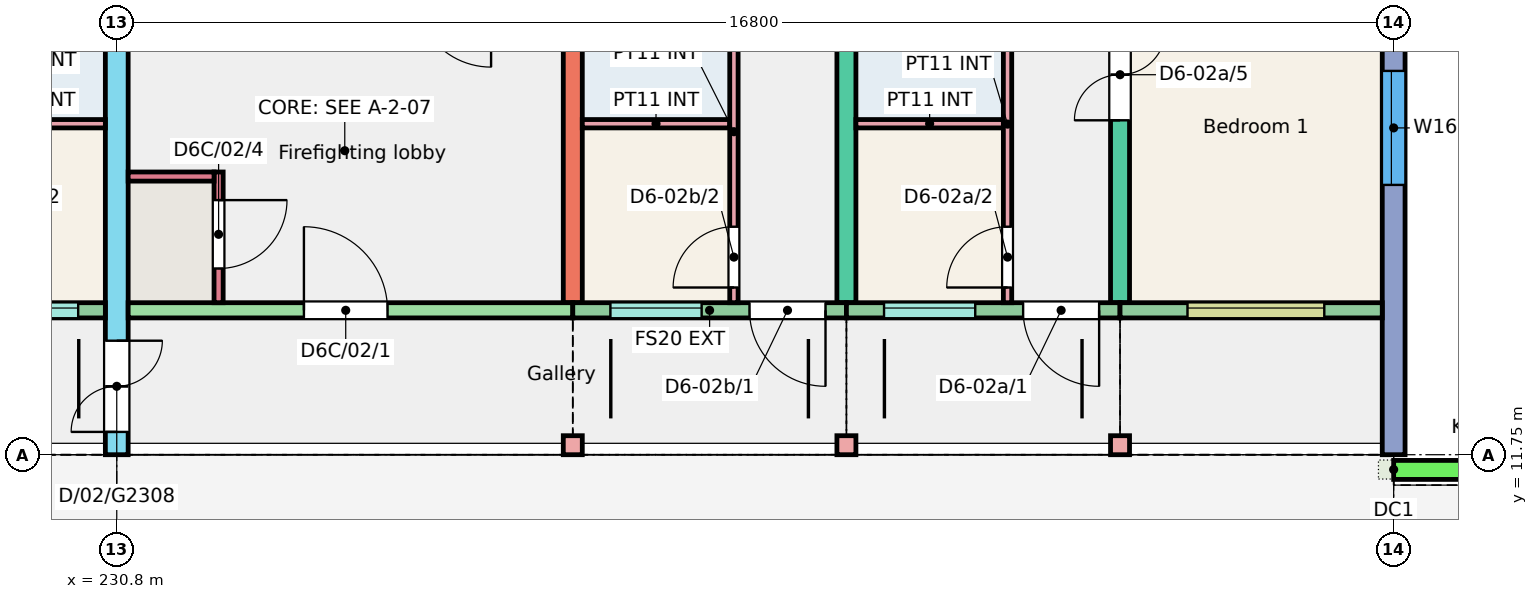
"""IFC4 building model, lengths in metres.
Left out: names, types, materials, properties, quantities, classifications, styles, units other than length and angle.
Written with IfcOpenShell. Run it as: python <this file> out.ifc"""

import sys

from ifc_helpers import new_model, si_unit, direction, frame, frame_2d, origin, origin_2d, place, context, subcontext, project, spatial, rectangle, extrude, element, fill, save


model = new_model("IFC4")
c1 = context("Model", 3, precision=1e-05, world=origin(), true_north=direction((0.0, 1.0)))
c2 = subcontext(c1, "Body", "Model", "MODEL_VIEW")
j1 = project(units=[si_unit("LENGTHUNIT", "METRE"), si_unit("PLANEANGLEUNIT", "RADIAN")], contexts=[c1])
p1 = place(None, origin())
s1 = spatial("IfcSite", under=j1, at=p1, CompositionType="ELEMENT")
p2 = place(p1, origin())
s2 = spatial("IfcBuilding", under=s1, at=p2, CompositionType="ELEMENT")
p3 = place(p2, frame((0.0, 0.0, 6.0)))
s3 = spatial("IfcBuildingStorey", under=s2, at=p3, CompositionType="ELEMENT", Elevation=6.0)
p4 = place(p3, frame((230.8, 11.75, 0.0), z_axis=(0.0, 0.0, 1.0), x_axis=(0.0, 1.0, 0.0)))
e1 = element("IfcWall", 1, at=p4, inside=s3, PredefinedType="SHEAR", context=c2, shape_type="SweptSolid", body=[
    extrude(rectangle(XDim=11.0, YDim=0.3, at=frame_2d((5.5, 0.0))), origin(), (0.0, 0.0, 1.0), 3.0),
])
p5 = place(p4, frame((0.3, 0.0, 0.0)))
e2 = element("IfcOpeningElement", 2, at=p5, cuts=e1, PredefinedType="OPENING", context=c2, shape_type="SweptSolid", body=[
    extrude(rectangle(XDim=1.2, YDim=2.1, at=frame_2d((0.6, 1.05))), frame((0.0, 0.16, 0.0), z_axis=(0.0, -1.0, 0.0), x_axis=(1.0, 0.0, 0.0)), (0.0, 0.0, 1.0), 0.32),
])
for number, where, z_axis, x_axis in (
    (3, (236.8, 13.75, 0.0), (0.0, 0.0, 1.0), (0.0, 1.0, 0.0)),
    (4, (240.4, 13.75, 0.0), (0.0, 0.0, 1.0), (0.0, 1.0, 0.0)),
):
    element("IfcWall", number, at=place(p3, frame(where, z_axis=z_axis, x_axis=x_axis)), inside=s3, PredefinedType="SHEAR", context=c2, shape_type="SweptSolid", body=[
        extrude(rectangle(XDim=9.0, YDim=0.25, at=frame_2d((4.5, 0.0))), origin(), (0.0, 0.0, 1.0), 3.0),
    ])
p6 = place(p3, frame((244.0, 13.75, 0.0), z_axis=(0.0, 0.0, 1.0), x_axis=(0.0, 1.0, 0.0)))
e5 = element("IfcWall", 5, at=p6, inside=s3, PredefinedType="SHEAR", context=c2, shape_type="SweptSolid", body=[
    extrude(rectangle(XDim=9.0, YDim=0.25, at=frame_2d((4.5, 0.0))), origin(), (0.0, 0.0, 1.0), 3.0),
])
p7 = place(p6, frame((2.4, 0.0, 0.0)))
e6 = element("IfcOpeningElement", 6, at=p7, cuts=e5, PredefinedType="OPENING", context=c2, shape_type="SweptSolid", body=[
    extrude(rectangle(XDim=1.2, YDim=2.1, at=frame_2d((0.6, 1.05))), frame((0.0, 0.135, 0.0), z_axis=(0.0, -1.0, 0.0), x_axis=(1.0, 0.0, 0.0)), (0.0, 0.0, 1.0), 0.27),
])
p8 = place(p6, frame((6.4, 0.0, 0.0)))
e7 = element("IfcOpeningElement", 7, at=p8, cuts=e5, PredefinedType="OPENING", context=c2, shape_type="SweptSolid", body=[
    extrude(rectangle(XDim=1.2, YDim=2.1, at=frame_2d((0.6, 1.05))), frame((0.0, 0.135, 0.0), z_axis=(0.0, -1.0, 0.0), x_axis=(1.0, 0.0, 0.0)), (0.0, 0.0, 1.0), 0.27),
])
p9 = place(p3, frame((247.6, 11.75, 0.0), z_axis=(0.0, 0.0, 1.0), x_axis=(0.0, 1.0, 0.0)))
e8 = element("IfcWall", 8, at=p9, inside=s3, PredefinedType="SHEAR", context=c2, shape_type="SweptSolid", body=[
    extrude(rectangle(XDim=11.0, YDim=0.3, at=frame_2d((5.5, 0.0))), origin(), (0.0, 0.0, 1.0), 3.0),
])
p10 = place(p9, frame((3.55, 0.0, 0.9)))
e9 = element("IfcOpeningElement", 9, at=p10, cuts=e8, PredefinedType="OPENING", context=c2, shape_type="SweptSolid", body=[
    extrude(rectangle(XDim=1.5, YDim=1.5, at=frame_2d((0.75, 0.75))), frame((0.0, 0.16, 0.0), z_axis=(0.0, -1.0, 0.0), x_axis=(1.0, 0.0, 0.0)), (0.0, 0.0, 1.0), 0.32),
])
p11 = place(p9, frame((7.955, 0.0, 0.9)))
e10 = element("IfcOpeningElement", 10, at=p11, cuts=e8, PredefinedType="OPENING", context=c2, shape_type="SweptSolid", body=[
    extrude(rectangle(XDim=1.8, YDim=1.5, at=frame_2d((0.9, 0.75))), frame((0.0, 0.16, 0.0), z_axis=(0.0, -1.0, 0.0), x_axis=(1.0, 0.0, 0.0)), (0.0, 0.0, 1.0), 0.32),
])
p12 = place(p3, frame((227.2, 13.65, 0.0), z_axis=(0.0, 0.0, 1.0), x_axis=(1.0, 0.0, 0.0)))
e11 = element("IfcWall", 11, at=p12, inside=s3, PredefinedType="SOLIDWALL", context=c2, shape_type="SweptSolid", body=[
    extrude(rectangle(XDim=3.45, YDim=0.2, at=frame_2d((1.725, 0.0))), origin(), (0.0, 0.0, 1.0), 3.0),
])
p13 = place(p12, frame((1.893, 0.0, 1.1)))
e12 = element("IfcOpeningElement", 12, at=p13, cuts=e11, PredefinedType="OPENING", context=c2, shape_type="SweptSolid", body=[
    extrude(rectangle(XDim=1.2, YDim=1.3, at=frame_2d((0.6, 0.65))), frame((0.0, 0.11, 0.0), z_axis=(0.0, -1.0, 0.0), x_axis=(1.0, 0.0, 0.0)), (0.0, 0.0, 1.0), 0.22),
])
p14 = place(p12, frame((0.275, 0.0, 0.0)))
e13 = element("IfcOpeningElement", 13, at=p14, cuts=e11, PredefinedType="OPENING", context=c2, shape_type="SweptSolid", body=[
    extrude(rectangle(XDim=1.0, YDim=2.1, at=frame_2d((0.5, 1.05))), frame((0.0, 0.11, 0.0), z_axis=(0.0, -1.0, 0.0), x_axis=(1.0, 0.0, 0.0)), (0.0, 0.0, 1.0), 0.22),
])
p15 = place(p3, frame((230.95, 13.65, 0.0), z_axis=(0.0, 0.0, 1.0), x_axis=(1.0, 0.0, 0.0)))
e14 = element("IfcWall", 14, at=p15, inside=s3, PredefinedType="SHEAR", context=c2, shape_type="SweptSolid", body=[
    extrude(rectangle(XDim=5.85, YDim=0.2, at=frame_2d((2.925, 0.0))), origin(), (0.0, 0.0, 1.0), 3.0),
])
p16 = place(p15, frame((2.312, 0.0, 0.0)))
e15 = element("IfcOpeningElement", 15, at=p16, cuts=e14, PredefinedType="OPENING", context=c2, shape_type="SweptSolid", body=[
    extrude(rectangle(XDim=1.1, YDim=2.1, at=frame_2d((0.55, 1.05))), frame((0.0, 0.11, 0.0), z_axis=(0.0, -1.0, 0.0), x_axis=(1.0, 0.0, 0.0)), (0.0, 0.0, 1.0), 0.22),
])
p17 = place(p3, frame((232.14, 13.75, 0.0), z_axis=(0.0, 0.0, 1.0), x_axis=(0.0, 1.0, 0.0)))
e16 = element("IfcWall", 16, at=p17, inside=s3, PredefinedType="SHEAR", context=c2, shape_type="SweptSolid", body=[
    extrude(rectangle(XDim=1.72, YDim=0.12, at=frame_2d((0.86, 0.0))), origin(), (0.0, 0.0, 1.0), 3.0),
])
p18 = place(p17, frame((0.45, 0.0, 0.0)))
e17 = element("IfcOpeningElement", 17, at=p18, cuts=e16, PredefinedType="OPENING", context=c2, shape_type="SweptSolid", body=[
    extrude(rectangle(XDim=0.9, YDim=2.1, at=frame_2d((0.45, 1.05))), frame((0.0, 0.07, 0.0), z_axis=(0.0, -1.0, 0.0), x_axis=(1.0, 0.0, 0.0)), (0.0, 0.0, 1.0), 0.14),
])
p19 = place(p3, frame((230.95, 15.41, 0.0), z_axis=(0.0, 0.0, 1.0), x_axis=(1.0, 0.0, 0.0)))
e18 = element("IfcWall", 18, at=p19, inside=s3, PredefinedType="SHEAR", context=c2, shape_type="SweptSolid", body=[
    extrude(rectangle(XDim=1.13, YDim=0.12, at=frame_2d((0.565, 0.0))), origin(), (0.0, 0.0, 1.0), 3.0),
])
p20 = place(p3, frame((236.8, 13.65, 0.0), z_axis=(0.0, 0.0, 1.0), x_axis=(1.0, 0.0, 0.0)))
e19 = element("IfcWall", 19, at=p20, inside=s3, PredefinedType="SOLIDWALL", context=c2, shape_type="SweptSolid", body=[
    extrude(rectangle(XDim=3.6, YDim=0.2, at=frame_2d((1.8, 0.0))), origin(), (0.0, 0.0, 1.0), 3.0),
])
p21 = place(p20, frame((0.495, 0.0, 1.1)))
e20 = element("IfcOpeningElement", 20, at=p21, cuts=e19, PredefinedType="OPENING", context=c2, shape_type="SweptSolid", body=[
    extrude(rectangle(XDim=1.2, YDim=1.3, at=frame_2d((0.6, 0.65))), frame((0.0, 0.11, 0.0), z_axis=(0.0, -1.0, 0.0), x_axis=(1.0, 0.0, 0.0)), (0.0, 0.0, 1.0), 0.22),
])
p22 = place(p20, frame((2.325, 0.0, 0.0)))
e21 = element("IfcOpeningElement", 21, at=p22, cuts=e19, PredefinedType="OPENING", context=c2, shape_type="SweptSolid", body=[
    extrude(rectangle(XDim=1.0, YDim=2.1, at=frame_2d((0.5, 1.05))), frame((0.0, 0.11, 0.0), z_axis=(0.0, -1.0, 0.0), x_axis=(1.0, 0.0, 0.0)), (0.0, 0.0, 1.0), 0.22),
])
p23 = place(p3, frame((240.4, 13.65, 0.0), z_axis=(0.0, 0.0, 1.0), x_axis=(1.0, 0.0, 0.0)))
e22 = element("IfcWall", 22, at=p23, inside=s3, PredefinedType="SOLIDWALL", context=c2, shape_type="SweptSolid", body=[
    extrude(rectangle(XDim=3.6, YDim=0.2, at=frame_2d((1.8, 0.0))), origin(), (0.0, 0.0, 1.0), 3.0),
])
p24 = place(p23, frame((0.495, 0.0, 1.1)))
e23 = element("IfcOpeningElement", 23, at=p24, cuts=e22, PredefinedType="OPENING", context=c2, shape_type="SweptSolid", body=[
    extrude(rectangle(XDim=1.2, YDim=1.3, at=frame_2d((0.6, 0.65))), frame((0.0, 0.11, 0.0), z_axis=(0.0, -1.0, 0.0), x_axis=(1.0, 0.0, 0.0)), (0.0, 0.0, 1.0), 0.22),
])
p25 = place(p23, frame((2.325, 0.0, 0.0)))
e24 = element("IfcOpeningElement", 24, at=p25, cuts=e22, PredefinedType="OPENING", context=c2, shape_type="SweptSolid", body=[
    extrude(rectangle(XDim=1.0, YDim=2.1, at=frame_2d((0.5, 1.05))), frame((0.0, 0.11, 0.0), z_axis=(0.0, -1.0, 0.0), x_axis=(1.0, 0.0, 0.0)), (0.0, 0.0, 1.0), 0.22),
])
p26 = place(p3, frame((244.0, 13.65, 0.0), z_axis=(0.0, 0.0, 1.0), x_axis=(1.0, 0.0, 0.0)))
e25 = element("IfcWall", 25, at=p26, inside=s3, PredefinedType="SOLIDWALL", context=c2, shape_type="SweptSolid", body=[
    extrude(rectangle(XDim=3.45, YDim=0.2, at=frame_2d((1.725, 0.0))), origin(), (0.0, 0.0, 1.0), 3.0),
])
p27 = place(p26, frame((0.887, 0.0, 1.1)))
e26 = element("IfcOpeningElement", 26, at=p27, cuts=e25, PredefinedType="OPENING", context=c2, shape_type="SweptSolid", body=[
    extrude(rectangle(XDim=1.8, YDim=1.3, at=frame_2d((0.9, 0.65))), frame((0.0, 0.11, 0.0), z_axis=(0.0, -1.0, 0.0), x_axis=(1.0, 0.0, 0.0)), (0.0, 0.0, 1.0), 0.22),
])
for number, where, z_axis, x_axis in (
    (27, (236.8, 11.875, 0.0), (0.0, 0.0, 1.0), (1.0, 0.0, 0.0)),
    (28, (240.4, 11.875, 0.0), (0.0, 0.0, 1.0), (1.0, 0.0, 0.0)),
    (29, (244.0, 11.875, 0.0), (0.0, 0.0, 1.0), (1.0, 0.0, 0.0)),
):
    element("IfcColumn", number, at=place(p3, frame(where, z_axis=z_axis, x_axis=x_axis)), inside=s3, PredefinedType="COLUMN", context=c2, shape_type="SweptSolid", body=[
        extrude(rectangle(XDim=0.25, YDim=0.25, at=origin_2d()), origin(), (0.0, 0.0, 1.0), 3.0),
    ])
p28 = place(p3, frame((247.6, 11.55, 0.0), z_axis=(0.0, 0.0, 1.0), x_axis=(1.0, 0.0, 0.0)))
e30 = element("IfcWall", 30, at=p28, inside=s3, PredefinedType="PARAPET", context=c2, shape_type="SweptSolid", body=[
    extrude(rectangle(XDim=2.7, YDim=0.25, at=frame_2d((1.35, 0.0))), origin(), (0.0, 0.0, 1.0), 1.1),
])
p29 = place(p3, frame((228.735, 16.105, 0.0), z_axis=(0.0, 0.0, 1.0), x_axis=(1.0, 0.0, 0.0)))
e31 = element("IfcWall", 31, at=p29, inside=s3, PredefinedType="PARTITIONING", context=c2, shape_type="SweptSolid", body=[
    extrude(rectangle(XDim=1.915, YDim=0.11, at=frame_2d((0.958, 0.0))), origin(), (0.0, 0.0, 1.0), 2.8),
])
p30 = place(p3, frame((240.525, 16.105, 0.0), z_axis=(0.0, 0.0, 1.0), x_axis=(1.0, 0.0, 0.0)))
e32 = element("IfcWall", 32, at=p30, inside=s3, PredefinedType="PARTITIONING", context=c2, shape_type="SweptSolid", body=[
    extrude(rectangle(XDim=1.94, YDim=0.11, at=frame_2d((0.97, 0.0))), origin(), (0.0, 0.0, 1.0), 2.8),
])
p31 = place(p3, frame((242.52, 13.75, 0.0), z_axis=(0.0, 0.0, 1.0), x_axis=(0.0, 1.0, 0.0)))
e33 = element("IfcWall", 33, at=p31, inside=s3, PredefinedType="PARTITIONING", context=c2, shape_type="SweptSolid", body=[
    extrude(rectangle(XDim=4.7, YDim=0.11, at=frame_2d((2.35, 0.0))), origin(), (0.0, 0.0, 1.0), 2.8),
])
p32 = place(p31, frame((0.2, 0.0, 0.0)))
e34 = element("IfcOpeningElement", 34, at=p32, cuts=e33, PredefinedType="OPENING", context=c2, shape_type="SweptSolid", body=[
    extrude(rectangle(XDim=0.8, YDim=2.1, at=frame_2d((0.4, 1.05))), frame((0.0, 0.065, 0.0), z_axis=(0.0, -1.0, 0.0), x_axis=(1.0, 0.0, 0.0)), (0.0, 0.0, 1.0), 0.13),
])
p33 = place(p31, frame((3.75, 0.0, 0.0)))
e35 = element("IfcOpeningElement", 35, at=p33, cuts=e33, PredefinedType="OPENING", context=c2, shape_type="SweptSolid", body=[
    extrude(rectangle(XDim=0.8, YDim=2.1, at=frame_2d((0.4, 1.05))), frame((0.0, 0.065, 0.0), z_axis=(0.0, -1.0, 0.0), x_axis=(1.0, 0.0, 0.0)), (0.0, 0.0, 1.0), 0.13),
])
p34 = place(p3, frame((236.925, 16.105, 0.0), z_axis=(0.0, 0.0, 1.0), x_axis=(1.0, 0.0, 0.0)))
e36 = element("IfcWall", 36, at=p34, inside=s3, PredefinedType="PARTITIONING", context=c2, shape_type="SweptSolid", body=[
    extrude(rectangle(XDim=1.94, YDim=0.11, at=frame_2d((0.97, 0.0))), origin(), (0.0, 0.0, 1.0), 2.8),
])
p35 = place(p3, frame((238.92, 13.75, 0.0), z_axis=(0.0, 0.0, 1.0), x_axis=(0.0, 1.0, 0.0)))
e37 = element("IfcWall", 37, at=p35, inside=s3, PredefinedType="PARTITIONING", context=c2, shape_type="SweptSolid", body=[
    extrude(rectangle(XDim=4.5, YDim=0.11, at=frame_2d((2.25, 0.0))), origin(), (0.0, 0.0, 1.0), 2.8),
])
p36 = place(p35, frame((0.2, 0.0, 0.0)))
e38 = element("IfcOpeningElement", 38, at=p36, cuts=e37, PredefinedType="OPENING", context=c2, shape_type="SweptSolid", body=[
    extrude(rectangle(XDim=0.8, YDim=2.1, at=frame_2d((0.4, 1.05))), frame((0.0, 0.065, 0.0), z_axis=(0.0, -1.0, 0.0), x_axis=(1.0, 0.0, 0.0)), (0.0, 0.0, 1.0), 0.13),
])
p37 = place(p35, frame((3.55, 0.0, 0.0)))
e39 = element("IfcOpeningElement", 39, at=p37, cuts=e37, PredefinedType="OPENING", context=c2, shape_type="SweptSolid", body=[
    extrude(rectangle(XDim=0.8, YDim=2.1, at=frame_2d((0.4, 1.05))), frame((0.0, 0.065, 0.0), z_axis=(0.0, -1.0, 0.0), x_axis=(1.0, 0.0, 0.0)), (0.0, 0.0, 1.0), 0.13),
])
p38 = place(p13, origin())
e40 = element("IfcWindow", 40, at=p38, inside=s3, PartitioningType="SINGLE_PANEL", PredefinedType="WINDOW", context=c2, shape_type="SweptSolid", body=[
    extrude(rectangle(XDim=1.2, YDim=1.3, at=frame_2d((0.6, 0.65))), frame((0.0, 0.06, 0.0), z_axis=(0.0, -1.0, 0.0), x_axis=(1.0, 0.0, 0.0)), (0.0, 0.0, 1.0), 0.06),
])
fill(e12, e40)
p39 = place(p27, origin())
e41 = element("IfcWindow", 41, at=p39, inside=s3, PartitioningType="SINGLE_PANEL", PredefinedType="WINDOW", context=c2, shape_type="SweptSolid", body=[
    extrude(rectangle(XDim=1.8, YDim=1.3, at=frame_2d((0.9, 0.65))), frame((0.0, 0.06, 0.0), z_axis=(0.0, -1.0, 0.0), x_axis=(1.0, 0.0, 0.0)), (0.0, 0.0, 1.0), 0.06),
])
fill(e26, e41)
p40 = place(p24, origin())
e42 = element("IfcWindow", 42, at=p40, inside=s3, PartitioningType="SINGLE_PANEL", PredefinedType="WINDOW", context=c2, shape_type="SweptSolid", body=[
    extrude(rectangle(XDim=1.2, YDim=1.3, at=frame_2d((0.6, 0.65))), frame((0.0, 0.06, 0.0), z_axis=(0.0, -1.0, 0.0), x_axis=(1.0, 0.0, 0.0)), (0.0, 0.0, 1.0), 0.06),
])
fill(e23, e42)
p41 = place(p10, origin())
e43 = element("IfcWindow", 43, at=p41, inside=s3, PartitioningType="SINGLE_PANEL", PredefinedType="WINDOW", context=c2, shape_type="SweptSolid", body=[
    extrude(rectangle(XDim=1.5, YDim=1.5, at=frame_2d((0.75, 0.75))), frame((0.0, 0.06, 0.0), z_axis=(0.0, -1.0, 0.0), x_axis=(1.0, 0.0, 0.0)), (0.0, 0.0, 1.0), 0.06),
])
fill(e9, e43)
p42 = place(p21, origin())
e44 = element("IfcWindow", 44, at=p42, inside=s3, PartitioningType="SINGLE_PANEL", PredefinedType="WINDOW", context=c2, shape_type="SweptSolid", body=[
    extrude(rectangle(XDim=1.2, YDim=1.3, at=frame_2d((0.6, 0.65))), frame((0.0, 0.06, 0.0), z_axis=(0.0, -1.0, 0.0), x_axis=(1.0, 0.0, 0.0)), (0.0, 0.0, 1.0), 0.06),
])
fill(e20, e44)
p43 = place(p25, origin())
e45 = element("IfcDoor", 45, at=p43, inside=s3, OperationType="SINGLE_SWING_RIGHT", PredefinedType="DOOR", context=c2, shape_type="SweptSolid", body=[
    extrude(rectangle(XDim=1.0, YDim=2.1, at=frame_2d((0.5, 1.05))), frame((0.0, 0.025, 0.0), z_axis=(0.0, -1.0, 0.0), x_axis=(1.0, 0.0, 0.0)), (0.0, 0.0, 1.0), 0.05),
])
fill(e24, e45)
p44 = place(p32, origin())
e46 = element("IfcDoor", 46, at=p44, inside=s3, OperationType="SINGLE_SWING_LEFT", PredefinedType="DOOR", context=c2, shape_type="SweptSolid", body=[
    extrude(rectangle(XDim=0.8, YDim=2.1, at=frame_2d((0.4, 1.05))), frame((0.0, 0.025, 0.0), z_axis=(0.0, -1.0, 0.0), x_axis=(1.0, 0.0, 0.0)), (0.0, 0.0, 1.0), 0.05),
])
fill(e34, e46)
p45 = place(p7, origin())
e47 = element("IfcDoor", 47, at=p45, inside=s3, OperationType="DOUBLE_DOOR_SINGLE_SWING", PredefinedType="DOOR", context=c2, shape_type="SweptSolid", body=[
    extrude(rectangle(XDim=1.2, YDim=2.1, at=frame_2d((0.6, 1.05))), frame((0.0, 0.025, 0.0), z_axis=(0.0, -1.0, 0.0), x_axis=(1.0, 0.0, 0.0)), (0.0, 0.0, 1.0), 0.05),
])
fill(e6, e47)
p46 = place(p22, origin())
e48 = element("IfcDoor", 48, at=p46, inside=s3, OperationType="SINGLE_SWING_RIGHT", PredefinedType="DOOR", context=c2, shape_type="SweptSolid", body=[
    extrude(rectangle(XDim=1.0, YDim=2.1, at=frame_2d((0.5, 1.05))), frame((0.0, 0.025, 0.0), z_axis=(0.0, -1.0, 0.0), x_axis=(1.0, 0.0, 0.0)), (0.0, 0.0, 1.0), 0.05),
])
fill(e21, e48)
p47 = place(p36, origin())
e49 = element("IfcDoor", 49, at=p47, inside=s3, OperationType="SINGLE_SWING_LEFT", PredefinedType="DOOR", context=c2, shape_type="SweptSolid", body=[
    extrude(rectangle(XDim=0.8, YDim=2.1, at=frame_2d((0.4, 1.05))), frame((0.0, 0.025, 0.0), z_axis=(0.0, -1.0, 0.0), x_axis=(1.0, 0.0, 0.0)), (0.0, 0.0, 1.0), 0.05),
])
fill(e38, e49)
p48 = place(p16, origin())
e50 = element("IfcDoor", 50, at=p48, inside=s3, OperationType="SINGLE_SWING_LEFT", PredefinedType="DOOR", context=c2, shape_type="SweptSolid", body=[
    extrude(rectangle(XDim=1.1, YDim=2.1, at=frame_2d((0.55, 1.05))), frame((0.0, 0.025, 0.0), z_axis=(0.0, -1.0, 0.0), x_axis=(1.0, 0.0, 0.0)), (0.0, 0.0, 1.0), 0.05),
])
fill(e15, e50)
p49 = place(p18, origin())
e51 = element("IfcDoor", 51, at=p49, inside=s3, OperationType="SINGLE_SWING_RIGHT", PredefinedType="DOOR", context=c2, shape_type="SweptSolid", body=[
    extrude(rectangle(XDim=0.9, YDim=2.1, at=frame_2d((0.45, 1.05))), frame((0.0, 0.025, 0.0), z_axis=(0.0, -1.0, 0.0), x_axis=(1.0, 0.0, 0.0)), (0.0, 0.0, 1.0), 0.05),
])
fill(e17, e51)
p50 = place(p5, origin())
e52 = element("IfcDoor", 52, at=p50, inside=s3, OperationType="DOUBLE_DOOR_SINGLE_SWING", PredefinedType="DOOR", context=c2, shape_type="SweptSolid", body=[
    extrude(rectangle(XDim=1.2, YDim=2.1, at=frame_2d((0.6, 1.05))), frame((0.0, 0.025, 0.0), z_axis=(0.0, -1.0, 0.0), x_axis=(1.0, 0.0, 0.0)), (0.0, 0.0, 1.0), 0.05),
])
fill(e2, e52)
save(model, sys.argv[1])
